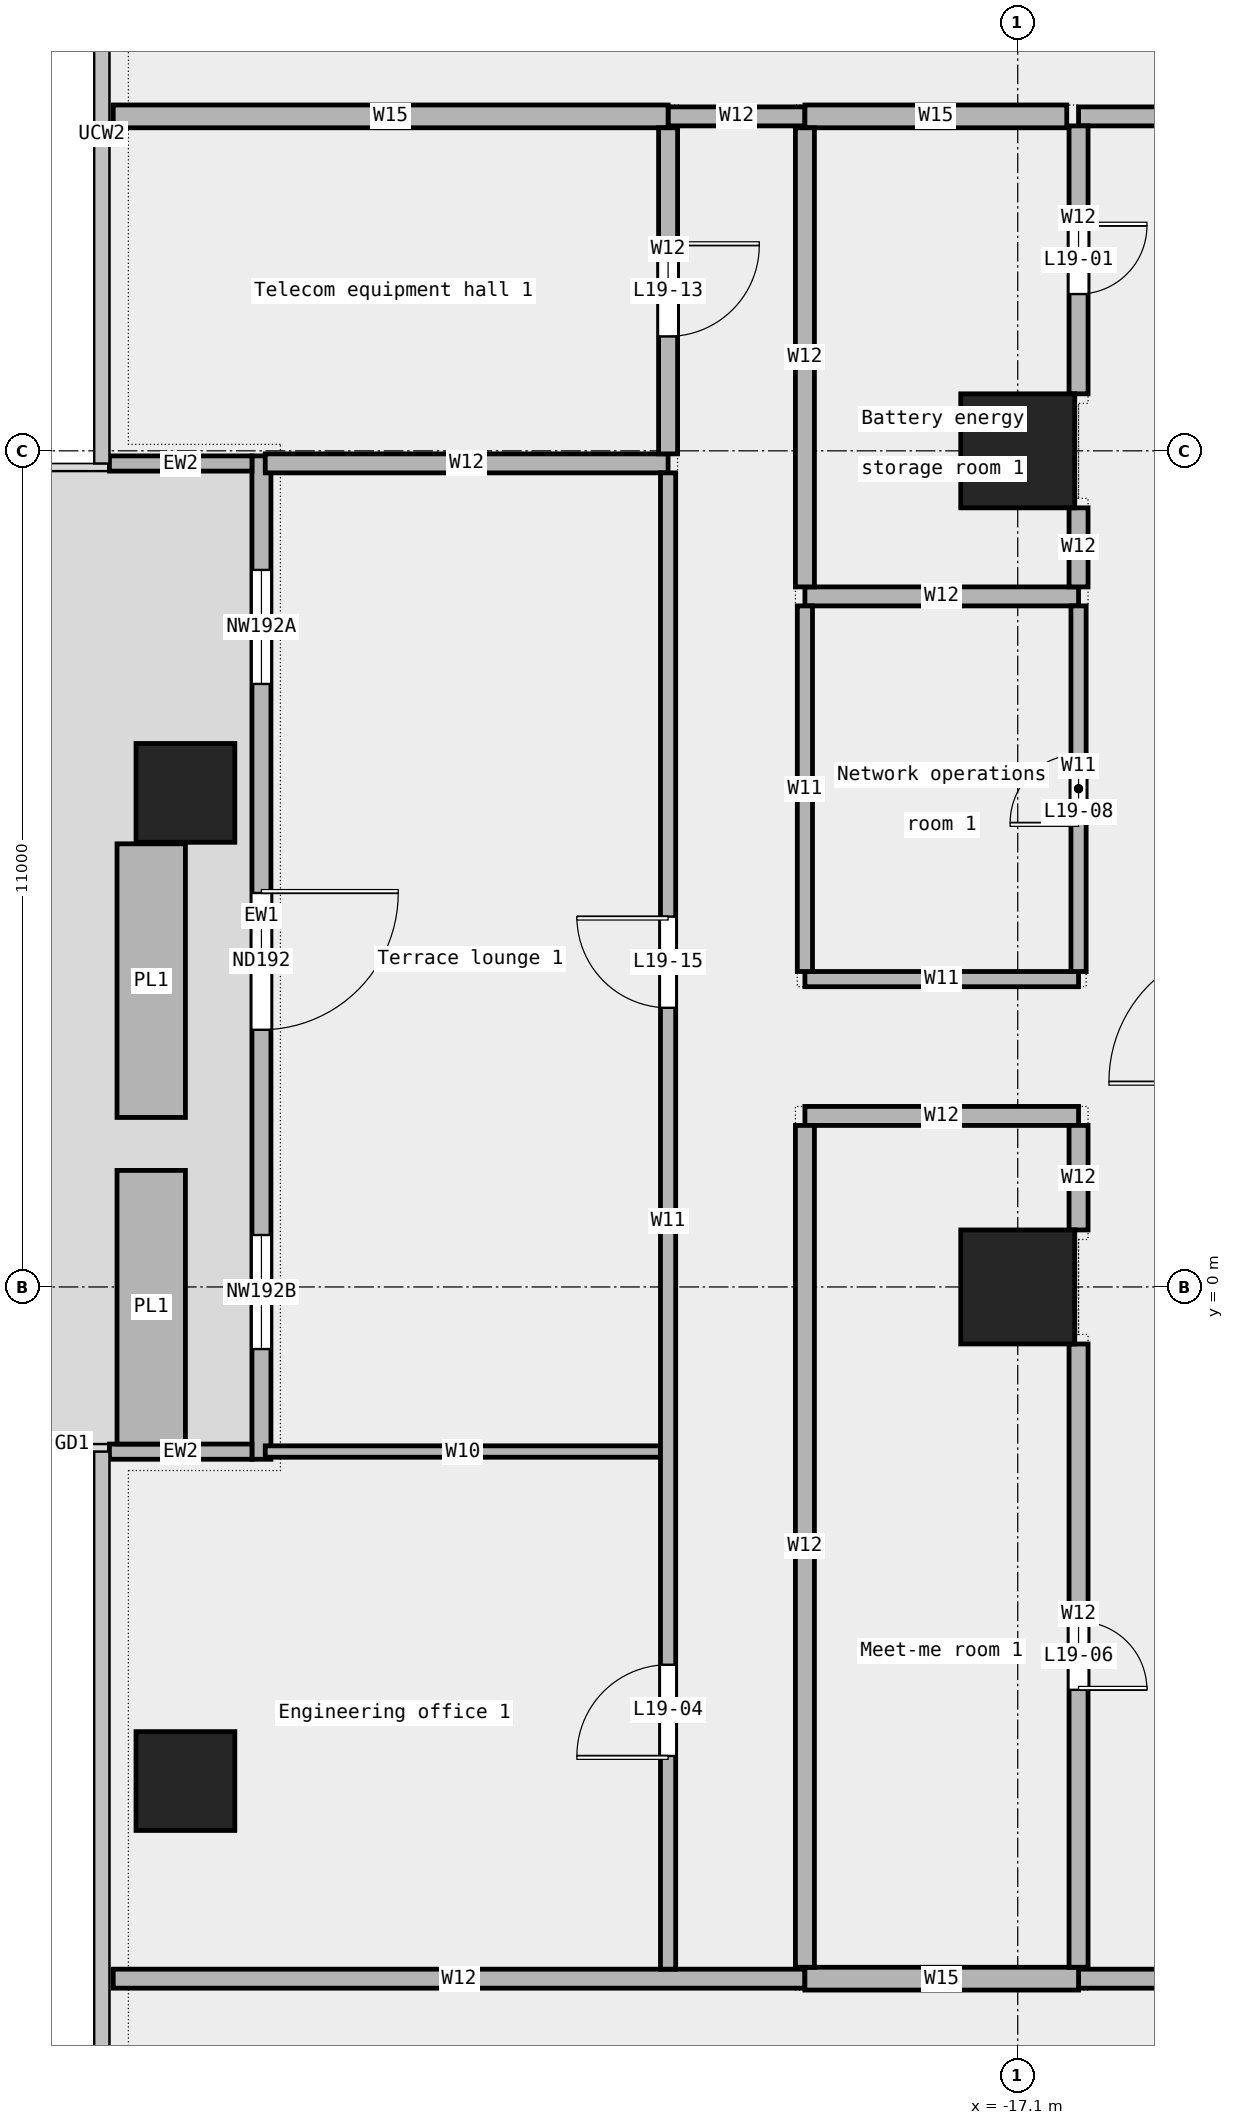
"""IFC4 building model, lengths in metres.
Left out: names, types, materials, properties, quantities, classifications, styles, units other than length and angle.
Written with IfcOpenShell. Run it as: python <this file> out.ifc"""

import sys

from ifc_helpers import new_model, si_unit, direction, frame, frame_2d, origin, origin_2d, place, context, subcontext, project, spatial, rectangle, extrude, element, fill, save


model = new_model("IFC4")
c1 = context("Model", 3, precision=1e-05, world=origin(), true_north=direction((0.0, 1.0)))
c2 = subcontext(c1, "Body", "Model", "MODEL_VIEW")
j1 = project(units=[si_unit("LENGTHUNIT", "METRE"), si_unit("PLANEANGLEUNIT", "RADIAN")], contexts=[c1])
p1 = place(None, origin())
s1 = spatial("IfcSite", under=j1, at=p1, CompositionType="ELEMENT")
p2 = place(p1, origin())
s2 = spatial("IfcBuilding", under=s1, at=p2, CompositionType="ELEMENT")
p3 = place(p2, frame((0.0, 0.0, 99.1)))
s3 = spatial("IfcBuildingStorey", under=s2, at=p3, CompositionType="ELEMENT", Elevation=99.1)
for number, where, z_axis, x_axis in (
    (1, (-28.05, 6.5, 0.0), (0.0, 0.0, 1.0), (1.0, 0.0, 0.0)),
    (2, (-28.05, -6.5, 0.0), (0.0, 0.0, 1.0), (1.0, 0.0, 0.0)),
):
    element("IfcColumn", number, at=place(p3, frame(where, z_axis=z_axis, x_axis=x_axis)), inside=s3, PredefinedType="COLUMN", context=c2, shape_type="SweptSolid", body=[
        extrude(rectangle(XDim=1.3, YDim=1.3, at=origin_2d()), origin(), (0.0, 0.0, 1.0), 4.05),
    ])
for number, where, z_axis, x_axis in (
    (3, (-17.1, 0.0, 0.0), (0.0, 0.0, 1.0), (1.0, 0.0, 0.0)),
    (4, (-17.1, 11.0, 0.0), (0.0, 0.0, 1.0), (1.0, 0.0, 0.0)),
):
    element("IfcColumn", number, at=place(p3, frame(where, z_axis=z_axis, x_axis=x_axis)), inside=s3, PredefinedType="COLUMN", context=c2, shape_type="SweptSolid", body=[
        extrude(rectangle(XDim=1.5, YDim=1.5, at=origin_2d()), origin(), (0.0, 0.0, 1.0), 4.05),
    ])
p4 = place(p3, frame((-27.05, 10.933, 0.0), z_axis=(0.0, 0.0, 1.0), x_axis=(0.0, -1.0, 0.0)))
e5 = element("IfcWall", 5, at=p4, inside=s3, PredefinedType="STANDARD", context=c2, shape_type="SweptSolid", body=[
    extrude(rectangle(XDim=13.2, YDim=0.25, at=frame_2d((6.6, 0.0))), origin(), (0.0, 0.0, 1.0), 4.05),
])
p5 = place(p4, frame((1.5, 0.0, 0.45)))
e6 = element("IfcOpeningElement", 6, at=p5, cuts=e5, PredefinedType="OPENING", context=c2, shape_type="SweptSolid", body=[
    extrude(rectangle(XDim=1.5, YDim=3.0, at=frame_2d((0.75, 1.5))), frame((0.0, 0.137, 0.0), z_axis=(0.0, -1.0, 0.0), x_axis=(1.0, 0.0, 0.0)), (0.0, 0.0, 1.0), 0.274),
])
p6 = place(p4, frame((5.75, 0.0, 0.0)))
e7 = element("IfcOpeningElement", 7, at=p6, cuts=e5, PredefinedType="OPENING", context=c2, shape_type="SweptSolid", body=[
    extrude(rectangle(XDim=1.8, YDim=2.4, at=frame_2d((0.9, 1.2))), frame((0.0, 0.137, 0.0), z_axis=(0.0, -1.0, 0.0), x_axis=(1.0, 0.0, 0.0)), (0.0, 0.0, 1.0), 0.274),
])
p7 = place(p4, frame((10.25, 0.0, 0.45)))
e8 = element("IfcOpeningElement", 8, at=p7, cuts=e5, PredefinedType="OPENING", context=c2, shape_type="SweptSolid", body=[
    extrude(rectangle(XDim=1.5, YDim=3.0, at=frame_2d((0.75, 1.5))), frame((0.0, 0.137, 0.0), z_axis=(0.0, -1.0, 0.0), x_axis=(1.0, 0.0, 0.0)), (0.0, 0.0, 1.0), 0.274),
])
for number, where, z_axis, x_axis in (
    (9, (-29.05, 10.833, 0.0), (0.0, 0.0, 1.0), (1.0, 0.0, 0.0)),
    (10, (-29.05, -2.167, 0.0), (0.0, 0.0, 1.0), (1.0, 0.0, 0.0)),
):
    element("IfcWall", number, at=place(p3, frame(where, z_axis=z_axis, x_axis=x_axis)), inside=s3, PredefinedType="STANDARD", context=c2, shape_type="SweptSolid", body=[
        extrude(rectangle(XDim=1.875, YDim=0.2, at=frame_2d((0.938, 0.0))), origin(), (0.0, 0.0, 1.0), 4.05),
    ])
for number, where, z_axis, x_axis in (
    (11, (-28.5, 5.83, 0.0), (0.0, 0.0, 1.0), (0.0, -1.0, 0.0)),
    (12, (-28.5, 1.533, 0.0), (0.0, 0.0, 1.0), (0.0, -1.0, 0.0)),
):
    element("IfcWall", number, at=place(p3, frame(where, z_axis=z_axis, x_axis=x_axis)), inside=s3, PredefinedType="STANDARD", context=c2, shape_type="SweptSolid", body=[
        extrude(rectangle(XDim=3.6, YDim=0.9, at=frame_2d((1.8, 0.0))), origin(), (0.0, 0.0, 1.0), 0.7),
    ])
p8 = place(p3, frame((-29.0, -9.1, 0.0), z_axis=(0.0, 0.0, 1.0), x_axis=(1.0, 0.0, 0.0)))
e13 = element("IfcWall", 13, at=p8, inside=s3, PredefinedType="PARTITIONING", context=c2, shape_type="SweptSolid", body=[
    extrude(rectangle(XDim=9.1, YDim=0.25, at=frame_2d((4.55, 0.0))), origin(), (0.0, 0.0, 1.0), 4.05),
])
p9 = place(p3, frame((-16.3, -9.1, 0.0), z_axis=(0.0, 0.0, 1.0), x_axis=(1.0, 0.0, 0.0)))
e14 = element("IfcWall", 14, at=p9, inside=s3, PredefinedType="PARTITIONING", context=c2, shape_type="SweptSolid", body=[
    extrude(rectangle(XDim=2.73, YDim=0.25, at=frame_2d((1.365, 0.0))), origin(), (0.0, 0.0, 1.0), 4.05),
])
p10 = place(p3, frame((-19.9, -9.1, 0.0), z_axis=(0.0, 0.0, 1.0), x_axis=(1.0, 0.0, 0.0)))
e15 = element("IfcWall", 15, at=p10, inside=s3, PredefinedType="PARTITIONING", context=c2, shape_type="SweptSolid", body=[
    extrude(rectangle(XDim=3.6, YDim=0.3, at=frame_2d((1.8, 0.0))), origin(), (0.0, 0.0, 1.0), 4.05),
])
p11 = place(p3, frame((-27.0, -2.165, 0.0), z_axis=(0.0, 0.0, 1.0), x_axis=(1.0, 0.0, 0.0)))
e16 = element("IfcWall", 16, at=p11, inside=s3, PredefinedType="PARTITIONING", context=c2, shape_type="SweptSolid", body=[
    extrude(rectangle(XDim=5.2, YDim=0.15, at=frame_2d((2.6, 0.0))), origin(), (0.0, 0.0, 1.0), 4.05),
])
p12 = place(p3, frame((-19.9, 2.25, 0.0), z_axis=(0.0, 0.0, 1.0), x_axis=(1.0, 0.0, 0.0)))
e17 = element("IfcWall", 17, at=p12, inside=s3, PredefinedType="PARTITIONING", context=c2, shape_type="SweptSolid", body=[
    extrude(rectangle(XDim=3.6, YDim=0.25, at=frame_2d((1.8, 0.0))), origin(), (0.0, 0.0, 1.0), 4.05),
])
p13 = place(p3, frame((-19.9, 4.05, 0.0), z_axis=(0.0, 0.0, 1.0), x_axis=(1.0, 0.0, 0.0)))
e18 = element("IfcWall", 18, at=p13, inside=s3, PredefinedType="PARTITIONING", context=c2, shape_type="SweptSolid", body=[
    extrude(rectangle(XDim=3.6, YDim=0.2, at=frame_2d((1.8, 0.0))), origin(), (0.0, 0.0, 1.0), 4.05),
])
p14 = place(p3, frame((-19.9, 9.085, 0.0), z_axis=(0.0, 0.0, 1.0), x_axis=(1.0, 0.0, 0.0)))
e19 = element("IfcWall", 19, at=p14, inside=s3, PredefinedType="PARTITIONING", context=c2, shape_type="SweptSolid", body=[
    extrude(rectangle(XDim=3.6, YDim=0.25, at=frame_2d((1.8, 0.0))), origin(), (0.0, 0.0, 1.0), 4.05),
])
p15 = place(p3, frame((-27.0, 10.835, 0.0), z_axis=(0.0, 0.0, 1.0), x_axis=(1.0, 0.0, 0.0)))
e20 = element("IfcWall", 20, at=p15, inside=s3, PredefinedType="PARTITIONING", context=c2, shape_type="SweptSolid", body=[
    extrude(rectangle(XDim=5.3, YDim=0.25, at=frame_2d((2.65, 0.0))), origin(), (0.0, 0.0, 1.0), 4.05),
])
p16 = place(p3, frame((-21.7, 15.4, 0.0), z_axis=(0.0, 0.0, 1.0), x_axis=(1.0, 0.0, 0.0)))
e21 = element("IfcWall", 21, at=p16, inside=s3, PredefinedType="PARTITIONING", context=c2, shape_type="SweptSolid", body=[
    extrude(rectangle(XDim=1.8, YDim=0.25, at=frame_2d((0.9, 0.0))), origin(), (0.0, 0.0, 1.0), 4.05),
])
p17 = place(p3, frame((-16.3, 15.4, 0.0), z_axis=(0.0, 0.0, 1.0), x_axis=(1.0, 0.0, 0.0)))
e22 = element("IfcWall", 22, at=p17, inside=s3, PredefinedType="PARTITIONING", context=c2, shape_type="SweptSolid", body=[
    extrude(rectangle(XDim=17.3, YDim=0.25, at=frame_2d((8.65, 0.0))), origin(), (0.0, 0.0, 1.0), 4.05),
])
p18 = place(p17, frame((12.085, 0.0, 0.0)))
e23 = element("IfcOpeningElement", 23, at=p18, cuts=e22, PredefinedType="OPENING", context=c2, shape_type="SweptSolid", body=[
    extrude(rectangle(XDim=1.2, YDim=2.1, at=frame_2d((0.6, 1.05))), frame((0.0, 0.137, 0.0), z_axis=(0.0, -1.0, 0.0), x_axis=(1.0, 0.0, 0.0)), (0.0, 0.0, 1.0), 0.274),
])
p19 = place(p17, frame((3.135, 0.0, 0.0)))
e24 = element("IfcOpeningElement", 24, at=p19, cuts=e22, PredefinedType="OPENING", context=c2, shape_type="SweptSolid", body=[
    extrude(rectangle(XDim=1.8, YDim=2.1, at=frame_2d((0.9, 1.05))), frame((0.0, 0.137, 0.0), z_axis=(0.0, -1.0, 0.0), x_axis=(1.0, 0.0, 0.0)), (0.0, 0.0, 1.0), 0.274),
])
p20 = place(p3, frame((-29.0, 15.4, 0.0), z_axis=(0.0, 0.0, 1.0), x_axis=(1.0, 0.0, 0.0)))
e25 = element("IfcWall", 25, at=p20, inside=s3, PredefinedType="PARTITIONING", context=c2, shape_type="SweptSolid", body=[
    extrude(rectangle(XDim=7.3, YDim=0.3, at=frame_2d((3.65, 0.0))), origin(), (0.0, 0.0, 1.0), 4.05),
])
p21 = place(p3, frame((-19.9, 15.4, 0.0), z_axis=(0.0, 0.0, 1.0), x_axis=(1.0, 0.0, 0.0)))
e26 = element("IfcWall", 26, at=p21, inside=s3, PredefinedType="PARTITIONING", context=c2, shape_type="SweptSolid", body=[
    extrude(rectangle(XDim=3.445, YDim=0.3, at=frame_2d((1.722, 0.0))), origin(), (0.0, 0.0, 1.0), 4.05),
])
p22 = place(p3, frame((-21.7, -8.975, 0.0), z_axis=(0.0, 0.0, 1.0), x_axis=(0.0, 1.0, 0.0)))
e27 = element("IfcWall", 27, at=p22, inside=s3, PredefinedType="PARTITIONING", context=c2, shape_type="SweptSolid", body=[
    extrude(rectangle(XDim=19.685, YDim=0.2, at=frame_2d((9.843, 0.0))), origin(), (0.0, 0.0, 1.0), 4.05),
])
p23 = place(p22, frame((2.805, 0.0, 0.0)))
e28 = element("IfcOpeningElement", 28, at=p23, cuts=e27, PredefinedType="OPENING", context=c2, shape_type="SweptSolid", body=[
    extrude(rectangle(XDim=1.2, YDim=2.1, at=frame_2d((0.6, 1.05))), frame((0.0, 0.112, 0.0), z_axis=(0.0, -1.0, 0.0), x_axis=(1.0, 0.0, 0.0)), (0.0, 0.0, 1.0), 0.224),
])
p24 = place(p22, frame((12.647, 0.0, 0.0)))
e29 = element("IfcOpeningElement", 29, at=p24, cuts=e27, PredefinedType="OPENING", context=c2, shape_type="SweptSolid", body=[
    extrude(rectangle(XDim=1.2, YDim=2.1, at=frame_2d((0.6, 1.05))), frame((0.0, 0.112, 0.0), z_axis=(0.0, -1.0, 0.0), x_axis=(1.0, 0.0, 0.0)), (0.0, 0.0, 1.0), 0.224),
])
p25 = place(p3, frame((-21.7, 10.96, 0.0), z_axis=(0.0, 0.0, 1.0), x_axis=(0.0, 1.0, 0.0)))
e30 = element("IfcWall", 30, at=p25, inside=s3, PredefinedType="PARTITIONING", context=c2, shape_type="SweptSolid", body=[
    extrude(rectangle(XDim=4.29, YDim=0.25, at=frame_2d((2.145, 0.0))), origin(), (0.0, 0.0, 1.0), 4.05),
])
p26 = place(p25, frame((1.545, 0.0, 0.0)))
e31 = element("IfcOpeningElement", 31, at=p26, cuts=e30, PredefinedType="OPENING", context=c2, shape_type="SweptSolid", body=[
    extrude(rectangle(XDim=1.2, YDim=2.1, at=frame_2d((0.6, 1.05))), frame((0.0, 0.137, 0.0), z_axis=(0.0, -1.0, 0.0), x_axis=(1.0, 0.0, 0.0)), (0.0, 0.0, 1.0), 0.274),
])
p27 = place(p3, frame((-19.9, 4.15, 0.0), z_axis=(0.0, 0.0, 1.0), x_axis=(0.0, 1.0, 0.0)))
e32 = element("IfcWall", 32, at=p27, inside=s3, PredefinedType="PARTITIONING", context=c2, shape_type="SweptSolid", body=[
    extrude(rectangle(XDim=4.81, YDim=0.2, at=frame_2d((2.405, 0.0))), origin(), (0.0, 0.0, 1.0), 4.05),
])
p28 = place(p3, frame((-19.9, -8.95, 0.0), z_axis=(0.0, 0.0, 1.0), x_axis=(0.0, 1.0, 0.0)))
e33 = element("IfcWall", 33, at=p28, inside=s3, PredefinedType="PARTITIONING", context=c2, shape_type="SweptSolid", body=[
    extrude(rectangle(XDim=11.075, YDim=0.25, at=frame_2d((5.538, 0.0))), origin(), (0.0, 0.0, 1.0), 4.05),
])
p29 = place(p3, frame((-19.9, 9.21, 0.0), z_axis=(0.0, 0.0, 1.0), x_axis=(0.0, 1.0, 0.0)))
e34 = element("IfcWall", 34, at=p29, inside=s3, PredefinedType="PARTITIONING", context=c2, shape_type="SweptSolid", body=[
    extrude(rectangle(XDim=6.04, YDim=0.25, at=frame_2d((3.02, 0.0))), origin(), (0.0, 0.0, 1.0), 4.05),
])
p30 = place(p3, frame((-16.3, 4.15, 0.0), z_axis=(0.0, 0.0, 1.0), x_axis=(0.0, 1.0, 0.0)))
e35 = element("IfcWall", 35, at=p30, inside=s3, PredefinedType="PARTITIONING", context=c2, shape_type="SweptSolid", body=[
    extrude(rectangle(XDim=4.81, YDim=0.2, at=frame_2d((2.405, 0.0))), origin(), (0.0, 0.0, 1.0), 4.05),
])
p31 = place(p30, frame((1.955, 0.0, 0.0)))
e36 = element("IfcOpeningElement", 36, at=p31, cuts=e35, PredefinedType="OPENING", context=c2, shape_type="SweptSolid", body=[
    extrude(rectangle(XDim=0.9, YDim=2.1, at=frame_2d((0.45, 1.05))), frame((0.0, 0.112, 0.0), z_axis=(0.0, -1.0, 0.0), x_axis=(1.0, 0.0, 0.0)), (0.0, 0.0, 1.0), 0.224),
])
p32 = place(p3, frame((-16.3, -8.95, 0.0), z_axis=(0.0, 0.0, 1.0), x_axis=(0.0, 1.0, 0.0)))
e37 = element("IfcWall", 37, at=p32, inside=s3, PredefinedType="PARTITIONING", context=c2, shape_type="SweptSolid", body=[
    extrude(rectangle(XDim=8.2, YDim=0.25, at=frame_2d((4.1, 0.0))), origin(), (0.0, 0.0, 1.0), 4.05),
])
p33 = place(p32, frame((3.65, 0.0, 0.0)))
e38 = element("IfcOpeningElement", 38, at=p33, cuts=e37, PredefinedType="OPENING", context=c2, shape_type="SweptSolid", body=[
    extrude(rectangle(XDim=0.9, YDim=2.1, at=frame_2d((0.45, 1.05))), frame((0.0, 0.137, 0.0), z_axis=(0.0, -1.0, 0.0), x_axis=(1.0, 0.0, 0.0)), (0.0, 0.0, 1.0), 0.274),
])
p34 = place(p3, frame((-16.3, 0.75, 0.0), z_axis=(0.0, 0.0, 1.0), x_axis=(0.0, 1.0, 0.0)))
e39 = element("IfcWall", 39, at=p34, inside=s3, PredefinedType="PARTITIONING", context=c2, shape_type="SweptSolid", body=[
    extrude(rectangle(XDim=1.375, YDim=0.25, at=frame_2d((0.688, 0.0))), origin(), (0.0, 0.0, 1.0), 4.05),
])
p35 = place(p3, frame((-16.3, 9.21, 0.0), z_axis=(0.0, 0.0, 1.0), x_axis=(0.0, 1.0, 0.0)))
e40 = element("IfcWall", 40, at=p35, inside=s3, PredefinedType="PARTITIONING", context=c2, shape_type="SweptSolid", body=[
    extrude(rectangle(XDim=1.04, YDim=0.25, at=frame_2d((0.52, 0.0))), origin(), (0.0, 0.0, 1.0), 4.05),
])
p36 = place(p3, frame((-16.3, 11.75, 0.0), z_axis=(0.0, 0.0, 1.0), x_axis=(0.0, 1.0, 0.0)))
e41 = element("IfcWall", 41, at=p36, inside=s3, PredefinedType="PARTITIONING", context=c2, shape_type="SweptSolid", body=[
    extrude(rectangle(XDim=3.525, YDim=0.25, at=frame_2d((1.762, 0.0))), origin(), (0.0, 0.0, 1.0), 4.05),
])
p37 = place(p36, frame((1.312, 0.0, 0.0)))
e42 = element("IfcOpeningElement", 42, at=p37, cuts=e41, PredefinedType="OPENING", context=c2, shape_type="SweptSolid", body=[
    extrude(rectangle(XDim=0.9, YDim=2.1, at=frame_2d((0.45, 1.05))), frame((0.0, 0.137, 0.0), z_axis=(0.0, -1.0, 0.0), x_axis=(1.0, 0.0, 0.0)), (0.0, 0.0, 1.0), 0.274),
])
p38 = place(p5, origin())
e43 = element("IfcWindow", 43, at=p38, inside=s3, PartitioningType="SINGLE_PANEL", PredefinedType="WINDOW", context=c2, shape_type="SweptSolid", body=[
    extrude(rectangle(XDim=1.5, YDim=3.0, at=frame_2d((0.75, 1.5))), frame((0.0, 0.03, 0.0), z_axis=(0.0, -1.0, 0.0), x_axis=(1.0, 0.0, 0.0)), (0.0, 0.0, 1.0), 0.06),
])
fill(e6, e43)
p39 = place(p6, origin())
e44 = element("IfcDoor", 44, at=p39, inside=s3, OperationType="DOUBLE_DOOR_SINGLE_SWING", PredefinedType="DOOR", context=c2, shape_type="SweptSolid", body=[
    extrude(rectangle(XDim=1.8, YDim=2.4, at=frame_2d((0.9, 1.2))), frame((0.0, 0.025, 0.0), z_axis=(0.0, -1.0, 0.0), x_axis=(1.0, 0.0, 0.0)), (0.0, 0.0, 1.0), 0.05),
])
fill(e7, e44)
p40 = place(p7, origin())
e45 = element("IfcWindow", 45, at=p40, inside=s3, PartitioningType="SINGLE_PANEL", PredefinedType="WINDOW", context=c2, shape_type="SweptSolid", body=[
    extrude(rectangle(XDim=1.5, YDim=3.0, at=frame_2d((0.75, 1.5))), frame((0.0, 0.03, 0.0), z_axis=(0.0, -1.0, 0.0), x_axis=(1.0, 0.0, 0.0)), (0.0, 0.0, 1.0), 0.06),
])
fill(e8, e45)
p41 = place(p37, origin())
e46 = element("IfcDoor", 46, at=p41, inside=s3, OperationType="SINGLE_SWING_LEFT", PredefinedType="DOOR", context=c2, shape_type="SweptSolid", body=[
    extrude(rectangle(XDim=0.9, YDim=2.1, at=frame_2d((0.45, 1.05))), frame((0.0, 0.025, 0.0), z_axis=(0.0, -1.0, 0.0), x_axis=(1.0, 0.0, 0.0)), (0.0, 0.0, 1.0), 0.05),
])
fill(e42, e46)
p42 = place(p23, origin())
e47 = element("IfcDoor", 47, at=p42, inside=s3, OperationType="SINGLE_SWING_LEFT", PredefinedType="DOOR", context=c2, shape_type="SweptSolid", body=[
    extrude(rectangle(XDim=1.2, YDim=2.1, at=frame_2d((0.6, 1.05))), frame((0.0, 0.025, 0.0), z_axis=(0.0, -1.0, 0.0), x_axis=(1.0, 0.0, 0.0)), (0.0, 0.0, 1.0), 0.05),
])
fill(e28, e47)
p43 = place(p33, origin())
e48 = element("IfcDoor", 48, at=p43, inside=s3, OperationType="SINGLE_SWING_RIGHT", PredefinedType="DOOR", context=c2, shape_type="SweptSolid", body=[
    extrude(rectangle(XDim=0.9, YDim=2.1, at=frame_2d((0.45, 1.05))), frame((0.0, 0.025, 0.0), z_axis=(0.0, -1.0, 0.0), x_axis=(1.0, 0.0, 0.0)), (0.0, 0.0, 1.0), 0.05),
])
fill(e38, e48)
p44 = place(p31, origin())
e49 = element("IfcDoor", 49, at=p44, inside=s3, OperationType="SINGLE_SWING_LEFT", PredefinedType="DOOR", context=c2, shape_type="SweptSolid", body=[
    extrude(rectangle(XDim=0.9, YDim=2.1, at=frame_2d((0.45, 1.05))), frame((0.0, 0.025, 0.0), z_axis=(0.0, -1.0, 0.0), x_axis=(1.0, 0.0, 0.0)), (0.0, 0.0, 1.0), 0.05),
])
fill(e36, e49)
p45 = place(p26, origin())
e50 = element("IfcDoor", 50, at=p45, inside=s3, OperationType="SINGLE_SWING_LEFT", PredefinedType="DOOR", context=c2, shape_type="SweptSolid", body=[
    extrude(rectangle(XDim=1.2, YDim=2.1, at=frame_2d((0.6, 1.05))), frame((0.0, 0.025, 0.0), z_axis=(0.0, -1.0, 0.0), x_axis=(1.0, 0.0, 0.0)), (0.0, 0.0, 1.0), 0.05),
])
fill(e31, e50)
p46 = place(p24, origin())
e51 = element("IfcDoor", 51, at=p46, inside=s3, OperationType="SINGLE_SWING_RIGHT", PredefinedType="DOOR", context=c2, shape_type="SweptSolid", body=[
    extrude(rectangle(XDim=1.2, YDim=2.1, at=frame_2d((0.6, 1.05))), frame((0.0, 0.025, 0.0), z_axis=(0.0, -1.0, 0.0), x_axis=(1.0, 0.0, 0.0)), (0.0, 0.0, 1.0), 0.05),
])
fill(e29, e51)
save(model, sys.argv[1])
